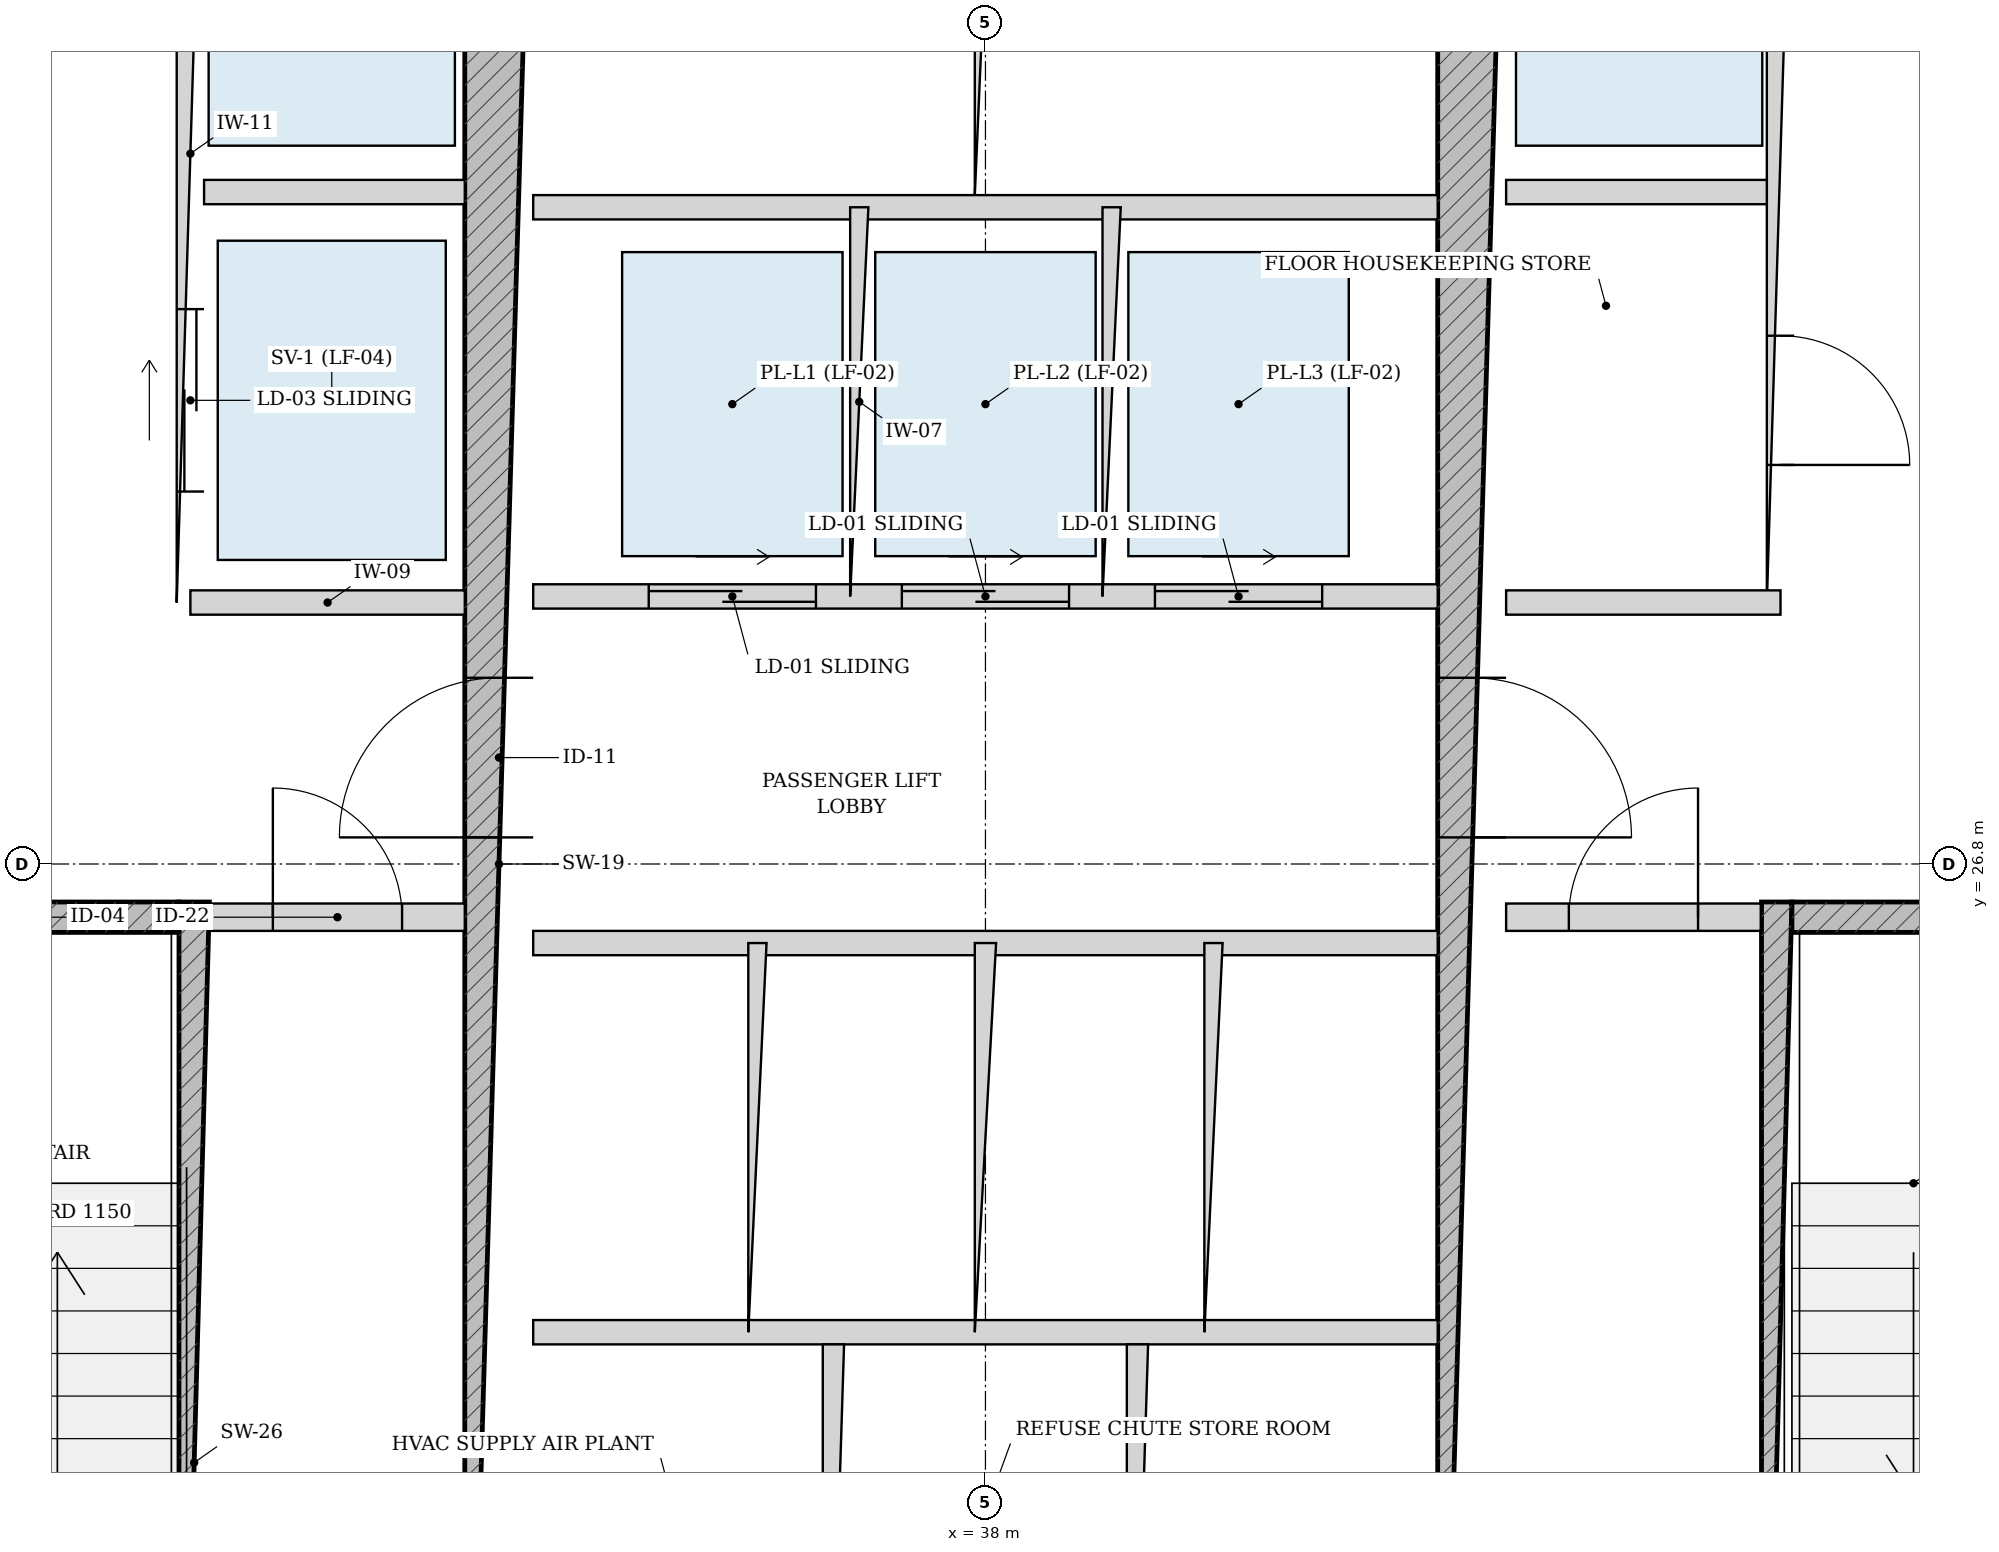
"""IFC4 building model, lengths in metres.
Left out: names, types, materials, properties, quantities, classifications, styles, units other than length and angle.
Written with IfcOpenShell. Run it as: python <this file> out.ifc"""

import sys

from ifc_helpers import new_model, si_unit, direction, frame, frame_2d, origin, place, context, subcontext, project, spatial, rectangle, extrude, source, transform, mapped, element, fill, save


model = new_model("IFC4")
c1 = context("Model", 3, precision=1e-05, world=origin(), true_north=direction((-0.2419218956, 0.970295726276)))
c2 = subcontext(c1, "Body", "Model", "MODEL_VIEW")
j1 = project(units=[si_unit("LENGTHUNIT", "METRE"), si_unit("PLANEANGLEUNIT", "RADIAN")], contexts=[c1])
p1 = place(None, origin())
s1 = spatial("IfcSite", under=j1, at=p1, CompositionType="ELEMENT")
p2 = place(p1, origin())
s2 = spatial("IfcBuilding", under=s1, at=p2, CompositionType="ELEMENT")
p3 = place(p2, frame((0.0, 0.0, 34.8)))
s3 = spatial("IfcBuildingStorey", under=s2, at=p3, CompositionType="ELEMENT", Elevation=34.8)
p4 = place(p3, frame((32.795, 19.175, 0.0), z_axis=(0.0, 0.0, 1.0), x_axis=(0.0, 1.0, 0.0)))
e1 = element("IfcWall", 1, at=p4, inside=s3, PredefinedType="SOLIDWALL", context=c2, shape_type="SweptSolid", body=[
    extrude(rectangle(XDim=7.375, YDim=0.2, at=frame_2d((3.688, 0.0))), origin(), (0.0, 0.0, 1.0), 3.32),
])
p5 = place(p3, frame((29.375, 26.45, 0.0), z_axis=(0.0, 0.0, 1.0), x_axis=(1.0, 0.0, 0.0)))
e2 = element("IfcWall", 2, at=p5, inside=s3, PredefinedType="SOLIDWALL", context=c2, shape_type="SweptSolid", body=[
    extrude(rectangle(XDim=3.32, YDim=0.2, at=frame_2d((1.66, 0.0))), origin(), (0.0, 0.0, 1.0), 3.32),
])
p6 = place(p5, frame((1.185, 0.0, 0.0)))
e3 = element("IfcOpeningElement", 3, at=p6, cuts=e2, PredefinedType="OPENING", context=c2, shape_type="SweptSolid", body=[
    extrude(rectangle(XDim=0.95, YDim=2.15, at=frame_2d((0.475, 1.075))), frame((0.0, 0.11, 0.0), z_axis=(0.0, -1.0, 0.0), x_axis=(1.0, 0.0, 0.0)), (0.0, 0.0, 1.0), 0.22),
])
p7 = place(p3, frame((43.205, 19.175, 0.0), z_axis=(0.0, 0.0, 1.0), x_axis=(0.0, 1.0, 0.0)))
e4 = element("IfcWall", 4, at=p7, inside=s3, PredefinedType="SOLIDWALL", context=c2, shape_type="SweptSolid", body=[
    extrude(rectangle(XDim=7.375, YDim=0.2, at=frame_2d((3.688, 0.0))), origin(), (0.0, 0.0, 1.0), 3.32),
])
p8 = place(p3, frame((43.305, 26.45, 0.0), z_axis=(0.0, 0.0, 1.0), x_axis=(1.0, 0.0, 0.0)))
e5 = element("IfcWall", 5, at=p8, inside=s3, PredefinedType="SOLIDWALL", context=c2, shape_type="SweptSolid", body=[
    extrude(rectangle(XDim=3.32, YDim=0.2, at=frame_2d((1.66, 0.0))), origin(), (0.0, 0.0, 1.0), 3.32),
])
p9 = place(p8, frame((1.185, 0.0, 0.0)))
e6 = element("IfcOpeningElement", 6, at=p9, cuts=e5, PredefinedType="OPENING", context=c2, shape_type="SweptSolid", body=[
    extrude(rectangle(XDim=0.95, YDim=2.15, at=frame_2d((0.475, 1.075))), frame((0.0, 0.11, 0.0), z_axis=(0.0, -1.0, 0.0), x_axis=(1.0, 0.0, 0.0)), (0.0, 0.0, 1.0), 0.22),
])
p10 = place(p3, frame((34.8, 19.175, 0.0), z_axis=(0.0, 0.0, 1.0), x_axis=(0.0, 1.0, 0.0)))
e7 = element("IfcWall", 7, at=p10, inside=s3, PredefinedType="SHEAR", context=c2, shape_type="SweptSolid", body=[
    extrude(rectangle(XDim=15.25, YDim=0.45, at=frame_2d((7.625, 0.0))), origin(), (0.0, 0.0, 1.0), 3.32),
])
p11 = place(p10, frame((7.8, 0.0, 0.0)))
e8 = element("IfcOpeningElement", 8, at=p11, cuts=e7, PredefinedType="OPENING", context=c2, shape_type="SweptSolid", body=[
    extrude(rectangle(XDim=1.05, YDim=2.15, at=frame_2d((0.525, 1.075))), frame((0.0, 0.235, 0.0), z_axis=(0.0, -1.0, 0.0), x_axis=(1.0, 0.0, 0.0)), (0.0, 0.0, 1.0), 0.47),
])
p12 = place(p3, frame((41.2, 19.175, 0.0), z_axis=(0.0, 0.0, 1.0), x_axis=(0.0, 1.0, 0.0)))
e9 = element("IfcWall", 9, at=p12, inside=s3, PredefinedType="SHEAR", context=c2, shape_type="SweptSolid", body=[
    extrude(rectangle(XDim=15.25, YDim=0.45, at=frame_2d((7.625, 0.0))), origin(), (0.0, 0.0, 1.0), 3.32),
])
p13 = place(p12, frame((7.8, 0.0, 0.0)))
e10 = element("IfcOpeningElement", 10, at=p13, cuts=e9, PredefinedType="OPENING", context=c2, shape_type="SweptSolid", body=[
    extrude(rectangle(XDim=1.05, YDim=2.15, at=frame_2d((0.525, 1.075))), frame((0.0, 0.235, 0.0), z_axis=(0.0, -1.0, 0.0), x_axis=(1.0, 0.0, 0.0)), (0.0, 0.0, 1.0), 0.47),
])
p14 = place(p3, frame((32.9, 26.45, 0.0), z_axis=(0.0, 0.0, 1.0), x_axis=(1.0, 0.0, 0.0)))
e11 = element("IfcWall", 11, at=p14, inside=s3, PredefinedType="PARTITIONING", context=c2, shape_type="SweptSolid", body=[
    extrude(rectangle(XDim=1.675, YDim=0.18, at=frame_2d((0.837, 0.0))), origin(), (0.0, 0.0, 1.0), 3.32),
])
p15 = place(p14, frame((0.413, 0.0, 0.0)))
e12 = element("IfcOpeningElement", 12, at=p15, cuts=e11, PredefinedType="OPENING", context=c2, shape_type="SweptSolid", body=[
    extrude(rectangle(XDim=0.85, YDim=2.1, at=frame_2d((0.425, 1.05))), frame((0.0, 0.1, 0.0), z_axis=(0.0, -1.0, 0.0), x_axis=(1.0, 0.0, 0.0)), (0.0, 0.0, 1.0), 0.2),
])
p16 = place(p3, frame((41.425, 26.45, 0.0), z_axis=(0.0, 0.0, 1.0), x_axis=(1.0, 0.0, 0.0)))
e13 = element("IfcWall", 13, at=p16, inside=s3, PredefinedType="PARTITIONING", context=c2, shape_type="SweptSolid", body=[
    extrude(rectangle(XDim=1.675, YDim=0.18, at=frame_2d((0.837, 0.0))), origin(), (0.0, 0.0, 1.0), 3.32),
])
p17 = place(p16, frame((0.413, 0.0, 0.0)))
e14 = element("IfcOpeningElement", 14, at=p17, cuts=e13, PredefinedType="OPENING", context=c2, shape_type="SweptSolid", body=[
    extrude(rectangle(XDim=0.85, YDim=2.1, at=frame_2d((0.425, 1.05))), frame((0.0, 0.1, 0.0), z_axis=(0.0, -1.0, 0.0), x_axis=(1.0, 0.0, 0.0)), (0.0, 0.0, 1.0), 0.2),
])
p18 = place(p3, frame((32.77, 28.52, 0.0), z_axis=(0.0, 0.0, 1.0), x_axis=(0.0, 1.0, 0.0)))
e15 = element("IfcWall", 15, at=p18, inside=s3, PredefinedType="PARTITIONING", context=c2, shape_type="SweptSolid", body=[
    extrude(rectangle(XDim=5.905, YDim=0.18, at=frame_2d((2.953, 0.0))), origin(), (0.0, 0.0, 1.0), 3.32),
])
p19 = place(p18, frame((3.655, 0.0, 0.0)))
e16 = element("IfcOpeningElement", 16, at=p19, cuts=e15, PredefinedType="OPENING", context=c2, shape_type="SweptSolid", body=[
    extrude(rectangle(XDim=1.15, YDim=2.2, at=frame_2d((0.575, 1.1))), frame((0.0, 0.1, 0.0), z_axis=(0.0, -1.0, 0.0), x_axis=(1.0, 0.0, 0.0)), (0.0, 0.0, 1.0), 0.2),
])
p20 = place(p18, frame((0.73, 0.0, 0.0)))
e17 = element("IfcOpeningElement", 17, at=p20, cuts=e15, PredefinedType="OPENING", context=c2, shape_type="SweptSolid", body=[
    extrude(rectangle(XDim=1.2, YDim=2.25, at=frame_2d((0.6, 1.125))), frame((0.0, 0.1, 0.0), z_axis=(0.0, -1.0, 0.0), x_axis=(1.0, 0.0, 0.0)), (0.0, 0.0, 1.0), 0.2),
])
p21 = place(p3, frame((32.86, 31.22, 0.0), z_axis=(0.0, 0.0, 1.0), x_axis=(1.0, 0.0, 0.0)))
e18 = element("IfcWall", 18, at=p21, inside=s3, PredefinedType="PARTITIONING", context=c2, shape_type="SweptSolid", body=[
    extrude(rectangle(XDim=1.715, YDim=0.16, at=frame_2d((0.857, 0.0))), origin(), (0.0, 0.0, 1.0), 3.32),
])
p22 = place(p3, frame((32.77, 28.52, 0.0), z_axis=(0.0, 0.0, 1.0), x_axis=(1.0, 0.0, 0.0)))
e19 = element("IfcWall", 19, at=p22, inside=s3, PredefinedType="PARTITIONING", context=c2, shape_type="SweptSolid", body=[
    extrude(rectangle(XDim=1.805, YDim=0.16, at=frame_2d((0.902, 0.0))), origin(), (0.0, 0.0, 1.0), 3.32),
])
p23 = place(p3, frame((43.23, 28.52, 0.0), z_axis=(0.0, 0.0, 1.0), x_axis=(0.0, 1.0, 0.0)))
e20 = element("IfcWall", 20, at=p23, inside=s3, PredefinedType="PARTITIONING", context=c2, shape_type="SweptSolid", body=[
    extrude(rectangle(XDim=5.905, YDim=0.18, at=frame_2d((2.953, 0.0))), origin(), (0.0, 0.0, 1.0), 3.32),
])
p24 = place(p23, frame((0.905, 0.0, 0.0)))
e21 = element("IfcOpeningElement", 21, at=p24, cuts=e20, PredefinedType="OPENING", context=c2, shape_type="SweptSolid", body=[
    extrude(rectangle(XDim=0.85, YDim=2.1, at=frame_2d((0.425, 1.05))), frame((0.0, 0.1, 0.0), z_axis=(0.0, -1.0, 0.0), x_axis=(1.0, 0.0, 0.0)), (0.0, 0.0, 1.0), 0.2),
])
p25 = place(p23, frame((3.655, 0.0, 0.0)))
e22 = element("IfcOpeningElement", 22, at=p25, cuts=e20, PredefinedType="OPENING", context=c2, shape_type="SweptSolid", body=[
    extrude(rectangle(XDim=1.15, YDim=2.2, at=frame_2d((0.575, 1.1))), frame((0.0, 0.1, 0.0), z_axis=(0.0, -1.0, 0.0), x_axis=(1.0, 0.0, 0.0)), (0.0, 0.0, 1.0), 0.2),
])
p26 = place(p3, frame((41.425, 31.22, 0.0), z_axis=(0.0, 0.0, 1.0), x_axis=(1.0, 0.0, 0.0)))
e23 = element("IfcWall", 23, at=p26, inside=s3, PredefinedType="PARTITIONING", context=c2, shape_type="SweptSolid", body=[
    extrude(rectangle(XDim=1.715, YDim=0.16, at=frame_2d((0.857, 0.0))), origin(), (0.0, 0.0, 1.0), 3.32),
])
p27 = place(p3, frame((41.425, 28.52, 0.0), z_axis=(0.0, 0.0, 1.0), x_axis=(1.0, 0.0, 0.0)))
e24 = element("IfcWall", 24, at=p27, inside=s3, PredefinedType="PARTITIONING", context=c2, shape_type="SweptSolid", body=[
    extrude(rectangle(XDim=1.805, YDim=0.16, at=frame_2d((0.902, 0.0))), origin(), (0.0, 0.0, 1.0), 3.32),
])
p28 = place(p3, frame((35.025, 28.56, 0.0), z_axis=(0.0, 0.0, 1.0), x_axis=(1.0, 0.0, 0.0)))
e25 = element("IfcWall", 25, at=p28, inside=s3, PredefinedType="PARTITIONING", context=c2, shape_type="SweptSolid", body=[
    extrude(rectangle(XDim=5.95, YDim=0.16, at=frame_2d((2.975, 0.0))), origin(), (0.0, 0.0, 1.0), 3.32),
])
p29 = place(p28, frame((0.76, 0.0, 0.0)))
e26 = element("IfcOpeningElement", 26, at=p29, cuts=e25, PredefinedType="OPENING", context=c2, shape_type="SweptSolid", body=[
    extrude(rectangle(XDim=1.1, YDim=2.2, at=frame_2d((0.55, 1.1))), frame((0.0, 0.09, 0.0), z_axis=(0.0, -1.0, 0.0), x_axis=(1.0, 0.0, 0.0)), (0.0, 0.0, 1.0), 0.18),
])
p30 = place(p28, frame((2.425, 0.0, 0.0)))
e27 = element("IfcOpeningElement", 27, at=p30, cuts=e25, PredefinedType="OPENING", context=c2, shape_type="SweptSolid", body=[
    extrude(rectangle(XDim=1.1, YDim=2.2, at=frame_2d((0.55, 1.1))), frame((0.0, 0.09, 0.0), z_axis=(0.0, -1.0, 0.0), x_axis=(1.0, 0.0, 0.0)), (0.0, 0.0, 1.0), 0.18),
])
p31 = place(p28, frame((4.09, 0.0, 0.0)))
e28 = element("IfcOpeningElement", 28, at=p31, cuts=e25, PredefinedType="OPENING", context=c2, shape_type="SweptSolid", body=[
    extrude(rectangle(XDim=1.1, YDim=2.2, at=frame_2d((0.55, 1.1))), frame((0.0, 0.09, 0.0), z_axis=(0.0, -1.0, 0.0), x_axis=(1.0, 0.0, 0.0)), (0.0, 0.0, 1.0), 0.18),
])
p32 = place(p3, frame((35.025, 31.12, 0.0), z_axis=(0.0, 0.0, 1.0), x_axis=(1.0, 0.0, 0.0)))
e29 = element("IfcWall", 29, at=p32, inside=s3, PredefinedType="PARTITIONING", context=c2, shape_type="SweptSolid", body=[
    extrude(rectangle(XDim=5.95, YDim=0.16, at=frame_2d((2.975, 0.0))), origin(), (0.0, 0.0, 1.0), 3.32),
])
for number, where, z_axis, x_axis in (
    (30, (37.17, 28.56, 0.0), (0.0, 0.0, 1.0), (0.0, 1.0, 0.0)),
    (31, (38.83, 28.56, 0.0), (0.0, 0.0, 1.0), (0.0, 1.0, 0.0)),
):
    element("IfcWall", number, at=place(p3, frame(where, z_axis=z_axis, x_axis=x_axis)), inside=s3, PredefinedType="PARTITIONING", context=c2, shape_type="SweptSolid", body=[
        extrude(rectangle(XDim=2.56, YDim=0.12, at=frame_2d((1.28, 0.0))), origin(), (0.0, 0.0, 1.0), 3.32),
    ])
p33 = place(p3, frame((38.0, 31.2, 0.0), z_axis=(0.0, 0.0, 1.0), x_axis=(0.0, 1.0, 0.0)))
e32 = element("IfcWall", 32, at=p33, inside=s3, PredefinedType="PARTITIONING", context=c2, shape_type="SweptSolid", body=[
    extrude(rectangle(XDim=3.225, YDim=0.14, at=frame_2d((1.613, 0.0))), origin(), (0.0, 0.0, 1.0), 3.32),
])
for number, where, z_axis, x_axis in (
    (33, (35.025, 26.28, 0.0), (0.0, 0.0, 1.0), (1.0, 0.0, 0.0)),
    (34, (35.025, 23.72, 0.0), (0.0, 0.0, 1.0), (1.0, 0.0, 0.0)),
):
    element("IfcWall", number, at=place(p3, frame(where, z_axis=z_axis, x_axis=x_axis)), inside=s3, PredefinedType="PARTITIONING", context=c2, shape_type="SweptSolid", body=[
        extrude(rectangle(XDim=5.95, YDim=0.16, at=frame_2d((2.975, 0.0))), origin(), (0.0, 0.0, 1.0), 3.32),
    ])
p34 = place(p3, frame((36.5, 23.72, 0.0), z_axis=(0.0, 0.0, 1.0), x_axis=(0.0, 1.0, 0.0)))
e35 = element("IfcWall", 35, at=p34, inside=s3, PredefinedType="PARTITIONING", context=c2, shape_type="SweptSolid", body=[
    extrude(rectangle(XDim=2.56, YDim=0.12, at=frame_2d((1.28, 0.0))), origin(), (0.0, 0.0, 1.0), 3.32),
])
p35 = place(p3, frame((38.0, 23.72, 0.0), z_axis=(0.0, 0.0, 1.0), x_axis=(0.0, 1.0, 0.0)))
e36 = element("IfcWall", 36, at=p35, inside=s3, PredefinedType="PARTITIONING", context=c2, shape_type="SweptSolid", body=[
    extrude(rectangle(XDim=2.56, YDim=0.14, at=frame_2d((1.28, 0.0))), origin(), (0.0, 0.0, 1.0), 3.32),
])
p36 = place(p3, frame((39.5, 23.72, 0.0), z_axis=(0.0, 0.0, 1.0), x_axis=(0.0, 1.0, 0.0)))
e37 = element("IfcWall", 37, at=p36, inside=s3, PredefinedType="PARTITIONING", context=c2, shape_type="SweptSolid", body=[
    extrude(rectangle(XDim=2.56, YDim=0.12, at=frame_2d((1.28, 0.0))), origin(), (0.0, 0.0, 1.0), 3.32),
])
p37 = place(p3, frame((37.0, 19.175, 0.0), z_axis=(0.0, 0.0, 1.0), x_axis=(0.0, 1.0, 0.0)))
e38 = element("IfcWall", 38, at=p37, inside=s3, PredefinedType="PARTITIONING", context=c2, shape_type="SweptSolid", body=[
    extrude(rectangle(XDim=4.465, YDim=0.14, at=frame_2d((2.232, 0.0))), origin(), (0.0, 0.0, 1.0), 3.32),
])
p38 = place(p37, frame((1.808, 0.0, 0.0)))
e39 = element("IfcOpeningElement", 39, at=p38, cuts=e38, PredefinedType="OPENING", context=c2, shape_type="SweptSolid", body=[
    extrude(rectangle(XDim=0.85, YDim=2.1, at=frame_2d((0.425, 1.05))), frame((0.0, 0.08, 0.0), z_axis=(0.0, -1.0, 0.0), x_axis=(1.0, 0.0, 0.0)), (0.0, 0.0, 1.0), 0.16),
])
p39 = place(p3, frame((39.0, 19.175, 0.0), z_axis=(0.0, 0.0, 1.0), x_axis=(0.0, 1.0, 0.0)))
e40 = element("IfcWall", 40, at=p39, inside=s3, PredefinedType="PARTITIONING", context=c2, shape_type="SweptSolid", body=[
    extrude(rectangle(XDim=4.465, YDim=0.14, at=frame_2d((2.232, 0.0))), origin(), (0.0, 0.0, 1.0), 3.32),
])
p40 = place(p39, frame((1.808, 0.0, 0.0)))
e41 = element("IfcOpeningElement", 41, at=p40, cuts=e40, PredefinedType="OPENING", context=c2, shape_type="SweptSolid", body=[
    extrude(rectangle(XDim=0.85, YDim=2.1, at=frame_2d((0.425, 1.05))), frame((0.0, 0.08, 0.0), z_axis=(0.0, -1.0, 0.0), x_axis=(1.0, 0.0, 0.0)), (0.0, 0.0, 1.0), 0.16),
])
m1 = source(origin(), c2, "Body", "SweptSolid", [
    extrude(rectangle(XDim=1.05, YDim=2.15, at=frame_2d((0.525, 1.075))), frame((0.0, 0.025, 0.0), z_axis=(0.0, -1.0, 0.0), x_axis=(1.0, 0.0, 0.0)), (0.0, 0.0, 1.0), 0.05),
])
p41 = place(p11, origin())
e42 = element("IfcDoor", 42, at=p41, inside=s3, OperationType="SINGLE_SWING_LEFT", PredefinedType="DOOR", context=c2, shape_type="MappedRepresentation", body=[
    mapped(m1, transform((0.0, 0.0, 0.0), scale=1.0)),
])
fill(e8, e42)
p42 = place(p13, frame((1.05, 0.0, 0.0), z_axis=(0.0, 0.0, 1.0), x_axis=(-1.0, 0.0, 0.0)))
e43 = element("IfcDoor", 43, at=p42, inside=s3, OperationType="SINGLE_SWING_RIGHT", PredefinedType="DOOR", context=c2, shape_type="MappedRepresentation", body=[
    mapped(m1, transform((0.0, 0.0, 0.0), scale=1.0)),
])
fill(e10, e43)
m2 = source(origin(), c2, "Body", "SweptSolid", [
    extrude(rectangle(XDim=0.85, YDim=2.1, at=frame_2d((0.425, 1.05))), frame((0.0, 0.025, 0.0), z_axis=(0.0, -1.0, 0.0), x_axis=(1.0, 0.0, 0.0)), (0.0, 0.0, 1.0), 0.05),
])
p43 = place(p15, origin())
e44 = element("IfcDoor", 44, at=p43, inside=s3, OperationType="SINGLE_SWING_LEFT", PredefinedType="DOOR", context=c2, shape_type="MappedRepresentation", body=[
    mapped(m2, transform((0.0, 0.0, 0.0), scale=1.0)),
])
fill(e12, e44)
p44 = place(p17, origin())
e45 = element("IfcDoor", 45, at=p44, inside=s3, OperationType="SINGLE_SWING_RIGHT", PredefinedType="DOOR", context=c2, shape_type="MappedRepresentation", body=[
    mapped(m2, transform((0.0, 0.0, 0.0), scale=1.0)),
])
fill(e14, e45)
p45 = place(p24, frame((0.85, 0.0, 0.0), z_axis=(0.0, 0.0, 1.0), x_axis=(-1.0, 0.0, 0.0)))
e46 = element("IfcDoor", 46, at=p45, inside=s3, OperationType="SINGLE_SWING_RIGHT", PredefinedType="DOOR", context=c2, shape_type="MappedRepresentation", body=[
    mapped(m2, transform((0.0, 0.0, 0.0), scale=1.0)),
])
fill(e21, e46)
m3 = source(origin(), c2, "Body", "SweptSolid", [
    extrude(rectangle(XDim=1.2, YDim=2.25, at=frame_2d((0.6, 1.125))), frame((0.0, 0.025, 0.0), z_axis=(0.0, -1.0, 0.0), x_axis=(1.0, 0.0, 0.0)), (0.0, 0.0, 1.0), 0.05),
])
p46 = place(p20, origin())
e47 = element("IfcDoor", 47, at=p46, inside=s3, OperationType="DOUBLE_DOOR_SLIDING", PredefinedType="DOOR", context=c2, shape_type="MappedRepresentation", body=[
    mapped(m3, transform((0.0, 0.0, 0.0), scale=1.0)),
])
fill(e17, e47)
m4 = source(origin(), c2, "Body", "SweptSolid", [
    extrude(rectangle(XDim=1.1, YDim=2.2, at=frame_2d((0.55, 1.1))), frame((0.0, 0.025, 0.0), z_axis=(0.0, -1.0, 0.0), x_axis=(1.0, 0.0, 0.0)), (0.0, 0.0, 1.0), 0.05),
])
p47 = place(p29, origin())
e48 = element("IfcDoor", 48, at=p47, inside=s3, OperationType="DOUBLE_DOOR_SLIDING", PredefinedType="DOOR", context=c2, shape_type="MappedRepresentation", body=[
    mapped(m4, transform((0.0, 0.0, 0.0), scale=1.0)),
])
fill(e26, e48)
p48 = place(p30, origin())
e49 = element("IfcDoor", 49, at=p48, inside=s3, OperationType="DOUBLE_DOOR_SLIDING", PredefinedType="DOOR", context=c2, shape_type="MappedRepresentation", body=[
    mapped(m4, transform((0.0, 0.0, 0.0), scale=1.0)),
])
fill(e27, e49)
p49 = place(p31, origin())
e50 = element("IfcDoor", 50, at=p49, inside=s3, OperationType="DOUBLE_DOOR_SLIDING", PredefinedType="DOOR", context=c2, shape_type="MappedRepresentation", body=[
    mapped(m4, transform((0.0, 0.0, 0.0), scale=1.0)),
])
fill(e28, e50)
save(model, sys.argv[1])
